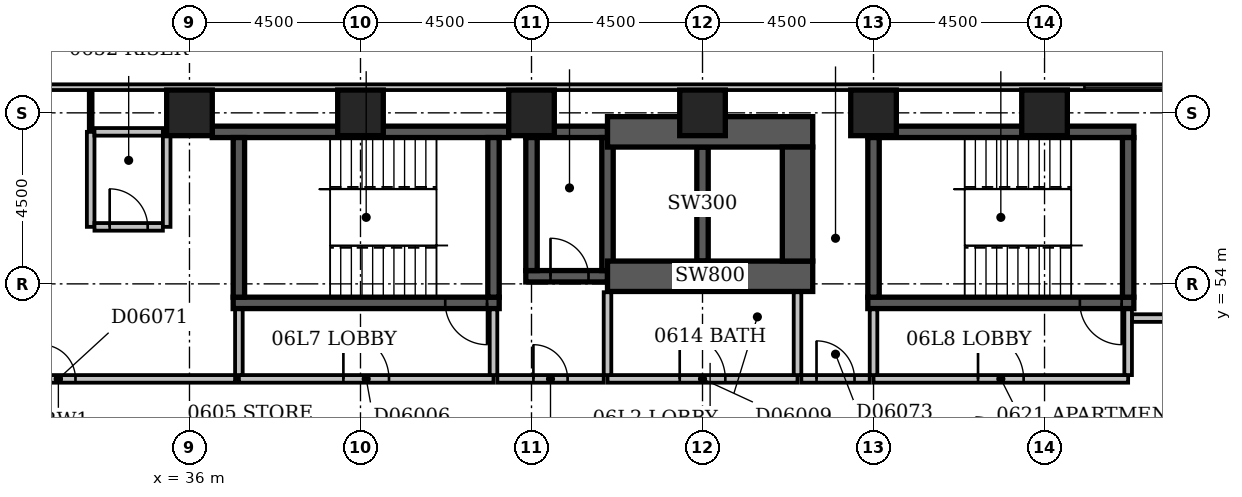
"""IFC4 building model, lengths in metres.
Left out: names, types, materials, properties, quantities, classifications, styles, units other than length and angle.
Written with IfcOpenShell. Run it as: python <this file> out.ifc"""

import sys

from ifc_helpers import new_model, si_unit, direction, frame, frame_2d, origin, origin_2d, place, context, subcontext, project, spatial, rectangle, extrude, element, fill, save


model = new_model("IFC4")
c1 = context("Model", 3, precision=1e-05, world=origin(), true_north=direction((0.0, 1.0)))
c2 = subcontext(c1, "Body", "Model", "MODEL_VIEW")
j1 = project(units=[si_unit("LENGTHUNIT", "METRE"), si_unit("PLANEANGLEUNIT", "RADIAN")], contexts=[c1])
p1 = place(None, origin())
s1 = spatial("IfcSite", under=j1, at=p1, CompositionType="ELEMENT")
p2 = place(p1, origin())
s2 = spatial("IfcBuilding", under=s1, at=p2, CompositionType="ELEMENT")
p3 = place(p2, frame((0.0, 0.0, 32.6)))
s3 = spatial("IfcBuildingStorey", under=s2, at=p3, CompositionType="ELEMENT", Elevation=32.6)
p4 = place(p3, frame((36.6, 58.0, -0.3), z_axis=(0.0, 0.0, 1.0), x_axis=(1.0, 0.0, 0.0)))
e1 = element("IfcWall", 1, at=p4, inside=s3, PredefinedType="SHEAR", context=c2, shape_type="SweptSolid", body=[
    extrude(rectangle(XDim=7.8, YDim=0.3, at=frame_2d((3.9, 0.0))), origin(), (0.0, 0.0, 1.0), 3.6),
])
p5 = place(p3, frame((37.15, 53.5, -0.3), z_axis=(0.0, 0.0, 1.0), x_axis=(1.0, 0.0, 0.0)))
e2 = element("IfcWall", 2, at=p5, inside=s3, PredefinedType="SHEAR", context=c2, shape_type="SweptSolid", body=[
    extrude(rectangle(XDim=7.0, YDim=0.3, at=frame_2d((3.5, 0.0))), origin(), (0.0, 0.0, 1.0), 3.6),
])
p6 = place(p5, frame((5.58, 0.0, 0.3)))
e3 = element("IfcOpeningElement", 3, at=p6, cuts=e2, PredefinedType="OPENING", context=c2, shape_type="SweptSolid", body=[
    extrude(rectangle(XDim=1.1, YDim=2.1, at=frame_2d((0.55, 1.05))), frame((0.0, 0.162, 0.0), z_axis=(0.0, -1.0, 0.0), x_axis=(1.0, 0.0, 0.0)), (0.0, 0.0, 1.0), 0.324),
])
for number, where, z_axis, x_axis in (
    (4, (37.3, 53.65, -0.3), (0.0, 0.0, 1.0), (0.0, 1.0, 0.0)),
    (5, (44.0, 53.65, -0.3), (0.0, 0.0, 1.0), (0.0, 1.0, 0.0)),
):
    element("IfcWall", number, at=place(p3, frame(where, z_axis=z_axis, x_axis=x_axis)), inside=s3, PredefinedType="SHEAR", context=c2, shape_type="SweptSolid", body=[
        extrude(rectangle(XDim=4.2, YDim=0.3, at=frame_2d((2.1, 0.0))), origin(), (0.0, 0.0, 1.0), 3.6),
    ])
p7 = place(p3, frame((44.85, 54.2, -0.3), z_axis=(0.0, 0.0, 1.0), x_axis=(1.0, 0.0, 0.0)))
e6 = element("IfcWall", 6, at=p7, inside=s3, PredefinedType="SHEAR", context=c2, shape_type="SweptSolid", body=[
    extrude(rectangle(XDim=2.15, YDim=0.3, at=frame_2d((1.075, 0.0))), origin(), (0.0, 0.0, 1.0), 3.6),
])
p8 = place(p7, frame((0.65, 0.0, 0.3)))
e7 = element("IfcOpeningElement", 7, at=p8, cuts=e6, PredefinedType="OPENING", context=c2, shape_type="SweptSolid", body=[
    extrude(rectangle(XDim=1.0, YDim=2.1, at=frame_2d((0.5, 1.05))), frame((0.0, 0.162, 0.0), z_axis=(0.0, -1.0, 0.0), x_axis=(1.0, 0.0, 0.0)), (0.0, 0.0, 1.0), 0.324),
])
p9 = place(p3, frame((44.85, 58.0, -0.3), z_axis=(0.0, 0.0, 1.0), x_axis=(1.0, 0.0, 0.0)))
e8 = element("IfcWall", 8, at=p9, inside=s3, PredefinedType="SHEAR", context=c2, shape_type="SweptSolid", body=[
    extrude(rectangle(XDim=2.15, YDim=0.3, at=frame_2d((1.075, 0.0))), origin(), (0.0, 0.0, 1.0), 3.6),
])
p10 = place(p3, frame((45.0, 54.35, -0.3), z_axis=(0.0, 0.0, 1.0), x_axis=(0.0, 1.0, 0.0)))
e9 = element("IfcWall", 9, at=p10, inside=s3, PredefinedType="SHEAR", context=c2, shape_type="SweptSolid", body=[
    extrude(rectangle(XDim=3.5, YDim=0.3, at=frame_2d((1.75, 0.0))), origin(), (0.0, 0.0, 1.0), 3.6),
])
p11 = place(p3, frame((47.0, 54.2, -0.3), z_axis=(0.0, 0.0, 1.0), x_axis=(1.0, 0.0, 0.0)))
e10 = element("IfcWall", 10, at=p11, inside=s3, PredefinedType="SHEAR", context=c2, shape_type="SweptSolid", body=[
    extrude(rectangle(XDim=5.4, YDim=0.8, at=frame_2d((2.7, 0.0))), origin(), (0.0, 0.0, 1.0), 3.6),
])
p12 = place(p3, frame((47.0, 54.35, -0.3), z_axis=(0.0, 0.0, 1.0), x_axis=(0.0, 1.0, 0.0)))
e11 = element("IfcWall", 11, at=p12, inside=s3, PredefinedType="SHEAR", context=c2, shape_type="SweptSolid", body=[
    extrude(rectangle(XDim=3.5, YDim=0.3, at=frame_2d((1.75, 0.0))), origin(), (0.0, 0.0, 1.0), 3.6),
])
p13 = place(p3, frame((47.0, 58.0, -0.3), z_axis=(0.0, 0.0, 1.0), x_axis=(1.0, 0.0, 0.0)))
e12 = element("IfcWall", 12, at=p13, inside=s3, PredefinedType="SHEAR", context=c2, shape_type="SweptSolid", body=[
    extrude(rectangle(XDim=5.4, YDim=0.8, at=frame_2d((2.7, 0.0))), origin(), (0.0, 0.0, 1.0), 3.6),
])
p14 = place(p3, frame((49.5, 54.6, -0.3), z_axis=(0.0, 0.0, 1.0), x_axis=(0.0, 1.0, 0.0)))
e13 = element("IfcWall", 13, at=p14, inside=s3, PredefinedType="SHEAR", context=c2, shape_type="SweptSolid", body=[
    extrude(rectangle(XDim=3.0, YDim=0.3, at=frame_2d((1.5, 0.0))), origin(), (0.0, 0.0, 1.0), 3.6),
])
p15 = place(p3, frame((52.0, 54.6, -0.3), z_axis=(0.0, 0.0, 1.0), x_axis=(0.0, 1.0, 0.0)))
e14 = element("IfcWall", 14, at=p15, inside=s3, PredefinedType="SHEAR", context=c2, shape_type="SweptSolid", body=[
    extrude(rectangle(XDim=3.0, YDim=0.8, at=frame_2d((1.5, 0.0))), origin(), (0.0, 0.0, 1.0), 3.6),
])
p16 = place(p3, frame((53.85, 53.5, -0.3), z_axis=(0.0, 0.0, 1.0), x_axis=(1.0, 0.0, 0.0)))
e15 = element("IfcWall", 15, at=p16, inside=s3, PredefinedType="SHEAR", context=c2, shape_type="SweptSolid", body=[
    extrude(rectangle(XDim=7.0, YDim=0.3, at=frame_2d((3.5, 0.0))), origin(), (0.0, 0.0, 1.0), 3.6),
])
p17 = place(p16, frame((5.58, 0.0, 0.3)))
e16 = element("IfcOpeningElement", 16, at=p17, cuts=e15, PredefinedType="OPENING", context=c2, shape_type="SweptSolid", body=[
    extrude(rectangle(XDim=1.1, YDim=2.1, at=frame_2d((0.55, 1.05))), frame((0.0, 0.162, 0.0), z_axis=(0.0, -1.0, 0.0), x_axis=(1.0, 0.0, 0.0)), (0.0, 0.0, 1.0), 0.324),
])
p18 = place(p3, frame((53.85, 58.0, -0.3), z_axis=(0.0, 0.0, 1.0), x_axis=(1.0, 0.0, 0.0)))
e17 = element("IfcWall", 17, at=p18, inside=s3, PredefinedType="SHEAR", context=c2, shape_type="SweptSolid", body=[
    extrude(rectangle(XDim=7.0, YDim=0.3, at=frame_2d((3.5, 0.0))), origin(), (0.0, 0.0, 1.0), 3.6),
])
for number, where, z_axis, x_axis in (
    (18, (54.0, 53.65, -0.3), (0.0, 0.0, 1.0), (0.0, 1.0, 0.0)),
    (19, (60.7, 53.65, -0.3), (0.0, 0.0, 1.0), (0.0, 1.0, 0.0)),
):
    element("IfcWall", number, at=place(p3, frame(where, z_axis=z_axis, x_axis=x_axis)), inside=s3, PredefinedType="SHEAR", context=c2, shape_type="SweptSolid", body=[
        extrude(rectangle(XDim=4.2, YDim=0.3, at=frame_2d((2.1, 0.0))), origin(), (0.0, 0.0, 1.0), 3.6),
    ])
for number, where, z_axis, x_axis in (
    (20, (36.0, 58.5, -0.3), (0.0, 0.0, 1.0), (1.0, 0.0, 0.0)),
    (21, (40.5, 58.5, -0.3), (0.0, 0.0, 1.0), (1.0, 0.0, 0.0)),
    (22, (45.0, 58.5, -0.3), (0.0, 0.0, 1.0), (1.0, 0.0, 0.0)),
    (23, (49.5, 58.5, -0.3), (0.0, 0.0, 1.0), (1.0, 0.0, 0.0)),
    (24, (54.0, 58.5, -0.3), (0.0, 0.0, 1.0), (1.0, 0.0, 0.0)),
    (25, (58.5, 58.5, -0.3), (0.0, 0.0, 1.0), (1.0, 0.0, 0.0)),
):
    element("IfcColumn", number, at=place(p3, frame(where, z_axis=z_axis, x_axis=x_axis)), inside=s3, PredefinedType="COLUMN", context=c2, shape_type="SweptSolid", body=[
        extrude(rectangle(XDim=1.2, YDim=1.2, at=origin_2d()), origin(), (0.0, 0.0, 1.0), 3.6),
    ])
p19 = place(p3, frame((68.1, 59.175, 0.0), z_axis=(0.0, 0.0, 1.0), x_axis=(-1.0, 0.0, 0.0)))
e26 = element("IfcWall", 26, at=p19, inside=s3, PredefinedType="STANDARD", context=c2, shape_type="SweptSolid", body=[
    extrude(rectangle(XDim=68.85, YDim=0.15, at=frame_2d((34.425, 0.0))), origin(), (0.0, 0.0, 1.0), 2.7),
])
p20 = place(p19, frame((1.65, 0.0, 0.6)))
e27 = element("IfcOpeningElement", 27, at=p20, cuts=e26, PredefinedType="OPENING", context=c2, shape_type="SweptSolid", body=[
    extrude(rectangle(XDim=2.4, YDim=1.8, at=frame_2d((1.2, 0.9))), frame((0.0, 0.087, 0.0), z_axis=(0.0, -1.0, 0.0), x_axis=(1.0, 0.0, 0.0)), (0.0, 0.0, 1.0), 0.174),
])
p21 = place(p19, frame((6.15, 0.0, 0.6)))
e28 = element("IfcOpeningElement", 28, at=p21, cuts=e26, PredefinedType="OPENING", context=c2, shape_type="SweptSolid", body=[
    extrude(rectangle(XDim=2.4, YDim=1.8, at=frame_2d((1.2, 0.9))), frame((0.0, 0.087, 0.0), z_axis=(0.0, -1.0, 0.0), x_axis=(1.0, 0.0, 0.0)), (0.0, 0.0, 1.0), 0.174),
])
p22 = place(p19, frame((38.67, 0.0, 0.6)))
e29 = element("IfcOpeningElement", 29, at=p22, cuts=e26, PredefinedType="OPENING", context=c2, shape_type="SweptSolid", body=[
    extrude(rectangle(XDim=1.5, YDim=1.8, at=frame_2d((0.75, 0.9))), frame((0.0, 0.087, 0.0), z_axis=(0.0, -1.0, 0.0), x_axis=(1.0, 0.0, 0.0)), (0.0, 0.0, 1.0), 0.174),
])
p23 = place(p3, frame((47.0, 51.5, 0.0), z_axis=(0.0, 0.0, 1.0), x_axis=(1.0, 0.0, 0.0)))
e30 = element("IfcWall", 30, at=p23, inside=s3, PredefinedType="PARTITIONING", context=c2, shape_type="SweptSolid", body=[
    extrude(rectangle(XDim=5.0, YDim=0.2, at=frame_2d((2.5, 0.0))), origin(), (0.0, 0.0, 1.0), 3.3),
])
p24 = place(p23, frame((1.9, 0.0, 0.0)))
e31 = element("IfcOpeningElement", 31, at=p24, cuts=e30, PredefinedType="OPENING", context=c2, shape_type="SweptSolid", body=[
    extrude(rectangle(XDim=1.2, YDim=2.1, at=frame_2d((0.6, 1.05))), frame((0.0, 0.112, 0.0), z_axis=(0.0, -1.0, 0.0), x_axis=(1.0, 0.0, 0.0)), (0.0, 0.0, 1.0), 0.224),
])
for number, where, z_axis, x_axis in (
    (32, (52.0, 51.6, 0.0), (0.0, 0.0, 1.0), (0.0, 1.0, 0.0)),
    (33, (47.0, 51.6, 0.0), (0.0, 0.0, 1.0), (0.0, 1.0, 0.0)),
):
    element("IfcWall", number, at=place(p3, frame(where, z_axis=z_axis, x_axis=x_axis)), inside=s3, PredefinedType="PARTITIONING", context=c2, shape_type="SweptSolid", body=[
        extrude(rectangle(XDim=2.18, YDim=0.2, at=frame_2d((1.09, 0.0))), origin(), (0.0, 0.0, 1.0), 3.3),
    ])
p25 = place(p3, frame((37.3, 51.5, 0.0), z_axis=(0.0, 0.0, 1.0), x_axis=(1.0, 0.0, 0.0)))
e34 = element("IfcWall", 34, at=p25, inside=s3, PredefinedType="PARTITIONING", context=c2, shape_type="SweptSolid", body=[
    extrude(rectangle(XDim=6.7, YDim=0.2, at=frame_2d((3.35, 0.0))), origin(), (0.0, 0.0, 1.0), 3.3),
])
p26 = place(p25, frame((2.75, 0.0, 0.0)))
e35 = element("IfcOpeningElement", 35, at=p26, cuts=e34, PredefinedType="OPENING", context=c2, shape_type="SweptSolid", body=[
    extrude(rectangle(XDim=1.2, YDim=2.1, at=frame_2d((0.6, 1.05))), frame((0.0, 0.112, 0.0), z_axis=(0.0, -1.0, 0.0), x_axis=(1.0, 0.0, 0.0)), (0.0, 0.0, 1.0), 0.224),
])
for number, where, z_axis, x_axis in (
    (36, (44.0, 51.6, 0.0), (0.0, 0.0, 1.0), (0.0, 1.0, 0.0)),
    (37, (37.3, 51.6, 0.0), (0.0, 0.0, 1.0), (0.0, 1.0, 0.0)),
):
    element("IfcWall", number, at=place(p3, frame(where, z_axis=z_axis, x_axis=x_axis)), inside=s3, PredefinedType="PARTITIONING", context=c2, shape_type="SweptSolid", body=[
        extrude(rectangle(XDim=1.73, YDim=0.2, at=frame_2d((0.865, 0.0))), origin(), (0.0, 0.0, 1.0), 3.3),
    ])
p27 = place(p3, frame((54.0, 51.5, 0.0), z_axis=(0.0, 0.0, 1.0), x_axis=(1.0, 0.0, 0.0)))
e38 = element("IfcWall", 38, at=p27, inside=s3, PredefinedType="PARTITIONING", context=c2, shape_type="SweptSolid", body=[
    extrude(rectangle(XDim=6.7, YDim=0.2, at=frame_2d((3.35, 0.0))), origin(), (0.0, 0.0, 1.0), 3.3),
])
p28 = place(p27, frame((2.75, 0.0, 0.0)))
e39 = element("IfcOpeningElement", 39, at=p28, cuts=e38, PredefinedType="OPENING", context=c2, shape_type="SweptSolid", body=[
    extrude(rectangle(XDim=1.2, YDim=2.1, at=frame_2d((0.6, 1.05))), frame((0.0, 0.112, 0.0), z_axis=(0.0, -1.0, 0.0), x_axis=(1.0, 0.0, 0.0)), (0.0, 0.0, 1.0), 0.224),
])
p29 = place(p3, frame((60.7, 51.6, 0.0), z_axis=(0.0, 0.0, 1.0), x_axis=(0.0, 1.0, 0.0)))
e40 = element("IfcWall", 40, at=p29, inside=s3, PredefinedType="PARTITIONING", context=c2, shape_type="SweptSolid", body=[
    extrude(rectangle(XDim=1.73, YDim=0.2, at=frame_2d((0.865, 0.0))), origin(), (0.0, 0.0, 1.0), 3.3),
])
p30 = place(p3, frame((54.0, 51.6, 0.0), z_axis=(0.0, 0.0, 1.0), x_axis=(0.0, 1.0, 0.0)))
e41 = element("IfcWall", 41, at=p30, inside=s3, PredefinedType="PARTITIONING", context=c2, shape_type="SweptSolid", body=[
    extrude(rectangle(XDim=1.73, YDim=0.2, at=frame_2d((0.865, 0.0))), origin(), (0.0, 0.0, 1.0), 2.6),
])
p31 = place(p3, frame((27.9, 51.5, 0.0), z_axis=(0.0, 0.0, 1.0), x_axis=(1.0, 0.0, 0.0)))
e42 = element("IfcWall", 42, at=p31, inside=s3, PredefinedType="PARTITIONING", context=c2, shape_type="SweptSolid", body=[
    extrude(rectangle(XDim=9.3, YDim=0.2, at=frame_2d((4.65, 0.0))), origin(), (0.0, 0.0, 1.0), 3.3),
])
p32 = place(p31, frame((4.2, 0.0, 0.0)))
e43 = element("IfcOpeningElement", 43, at=p32, cuts=e42, PredefinedType="OPENING", context=c2, shape_type="SweptSolid", body=[
    extrude(rectangle(XDim=0.9, YDim=2.1, at=frame_2d((0.45, 1.05))), frame((0.0, 0.112, 0.0), z_axis=(0.0, -1.0, 0.0), x_axis=(1.0, 0.0, 0.0)), (0.0, 0.0, 1.0), 0.224),
])
p33 = place(p3, frame((44.1, 51.5, 0.0), z_axis=(0.0, 0.0, 1.0), x_axis=(1.0, 0.0, 0.0)))
e44 = element("IfcWall", 44, at=p33, inside=s3, PredefinedType="PARTITIONING", context=c2, shape_type="SweptSolid", body=[
    extrude(rectangle(XDim=2.8, YDim=0.2, at=frame_2d((1.4, 0.0))), origin(), (0.0, 0.0, 1.0), 3.3),
])
p34 = place(p33, frame((0.95, 0.0, 0.0)))
e45 = element("IfcOpeningElement", 45, at=p34, cuts=e44, PredefinedType="OPENING", context=c2, shape_type="SweptSolid", body=[
    extrude(rectangle(XDim=0.9, YDim=2.1, at=frame_2d((0.45, 1.05))), frame((0.0, 0.112, 0.0), z_axis=(0.0, -1.0, 0.0), x_axis=(1.0, 0.0, 0.0)), (0.0, 0.0, 1.0), 0.224),
])
p35 = place(p3, frame((52.1, 51.5, 0.0), z_axis=(0.0, 0.0, 1.0), x_axis=(1.0, 0.0, 0.0)))
e46 = element("IfcWall", 46, at=p35, inside=s3, PredefinedType="PARTITIONING", context=c2, shape_type="SweptSolid", body=[
    extrude(rectangle(XDim=1.8, YDim=0.2, at=frame_2d((0.9, 0.0))), origin(), (0.0, 0.0, 1.0), 3.3),
])
p36 = place(p35, frame((0.4, 0.0, 0.0)))
e47 = element("IfcOpeningElement", 47, at=p36, cuts=e46, PredefinedType="OPENING", context=c2, shape_type="SweptSolid", body=[
    extrude(rectangle(XDim=1.0, YDim=2.1, at=frame_2d((0.5, 1.05))), frame((0.0, 0.112, 0.0), z_axis=(0.0, -1.0, 0.0), x_axis=(1.0, 0.0, 0.0)), (0.0, 0.0, 1.0), 0.224),
])
p37 = place(p3, frame((60.8, 53.1, 0.0), z_axis=(0.0, 0.0, 1.0), x_axis=(1.0, 0.0, 0.0)))
e48 = element("IfcWall", 48, at=p37, inside=s3, PredefinedType="PARTITIONING", context=c2, shape_type="SweptSolid", body=[
    extrude(rectangle(XDim=7.3, YDim=0.2, at=frame_2d((3.65, 0.0))), origin(), (0.0, 0.0, 1.0), 3.3),
])
p38 = place(p37, frame((2.85, 0.0, 0.0)))
e49 = element("IfcOpeningElement", 49, at=p38, cuts=e48, PredefinedType="OPENING", context=c2, shape_type="SweptSolid", body=[
    extrude(rectangle(XDim=0.9, YDim=2.1, at=frame_2d((0.45, 1.05))), frame((0.0, 0.112, 0.0), z_axis=(0.0, -1.0, 0.0), x_axis=(1.0, 0.0, 0.0)), (0.0, 0.0, 1.0), 0.224),
])
p39 = place(p3, frame((33.4, 55.5, 0.0), z_axis=(0.0, 0.0, 1.0), x_axis=(0.0, 1.0, 0.0)))
e50 = element("IfcWall", 50, at=p39, inside=s3, PredefinedType="PARTITIONING", context=c2, shape_type="SweptSolid", body=[
    extrude(rectangle(XDim=2.5, YDim=0.2, at=frame_2d((1.25, 0.0))), origin(), (0.0, 0.0, 1.0), 3.3),
])
p40 = place(p3, frame((33.5, 55.5, 0.0), z_axis=(0.0, 0.0, 1.0), x_axis=(1.0, 0.0, 0.0)))
e51 = element("IfcWall", 51, at=p40, inside=s3, PredefinedType="PARTITIONING", context=c2, shape_type="SweptSolid", body=[
    extrude(rectangle(XDim=1.8, YDim=0.2, at=frame_2d((0.9, 0.0))), origin(), (0.0, 0.0, 1.0), 3.3),
])
p41 = place(p40, frame((0.4, 0.0, 0.0)))
e52 = element("IfcOpeningElement", 52, at=p41, cuts=e51, PredefinedType="OPENING", context=c2, shape_type="SweptSolid", body=[
    extrude(rectangle(XDim=1.0, YDim=2.1, at=frame_2d((0.5, 1.05))), frame((0.0, 0.112, 0.0), z_axis=(0.0, -1.0, 0.0), x_axis=(1.0, 0.0, 0.0)), (0.0, 0.0, 1.0), 0.224),
])
p42 = place(p3, frame((35.4, 55.5, 0.0), z_axis=(0.0, 0.0, 1.0), x_axis=(0.0, 1.0, 0.0)))
e53 = element("IfcWall", 53, at=p42, inside=s3, PredefinedType="PARTITIONING", context=c2, shape_type="SweptSolid", body=[
    extrude(rectangle(XDim=2.5, YDim=0.2, at=frame_2d((1.25, 0.0))), origin(), (0.0, 0.0, 1.0), 2.4),
])
p43 = place(p3, frame((33.4, 58.0, 0.0), z_axis=(0.0, 0.0, 1.0), x_axis=(0.0, 1.0, 0.0)))
e54 = element("IfcWall", 54, at=p43, inside=s3, PredefinedType="PARTITIONING", context=c2, shape_type="SweptSolid", body=[
    extrude(rectangle(XDim=1.1, YDim=0.1, at=frame_2d((0.55, 0.0))), origin(), (0.0, 0.0, 1.0), 3.3),
])
p44 = place(p3, frame((33.5, 58.0, 0.0), z_axis=(0.0, 0.0, 1.0), x_axis=(1.0, 0.0, 0.0)))
e55 = element("IfcWall", 55, at=p44, inside=s3, PredefinedType="PARTITIONING", context=c2, shape_type="SweptSolid", body=[
    extrude(rectangle(XDim=1.8, YDim=0.2, at=frame_2d((0.9, 0.0))), origin(), (0.0, 0.0, 1.0), 3.3),
])
p45 = place(p21, origin())
e56 = element("IfcWindow", 56, at=p45, inside=s3, PartitioningType="SINGLE_PANEL", PredefinedType="WINDOW", context=c2, shape_type="SweptSolid", body=[
    extrude(rectangle(XDim=2.4, YDim=1.8, at=frame_2d((1.2, 0.9))), frame((0.0, 0.03, 0.0), z_axis=(0.0, -1.0, 0.0), x_axis=(1.0, 0.0, 0.0)), (0.0, 0.0, 1.0), 0.06),
])
fill(e28, e56)
p46 = place(p26, origin())
e57 = element("IfcDoor", 57, at=p46, inside=s3, OperationType="SINGLE_SWING_LEFT", PredefinedType="DOOR", context=c2, shape_type="SweptSolid", body=[
    extrude(rectangle(XDim=1.2, YDim=2.1, at=frame_2d((0.6, 1.05))), frame((0.0, 0.025, 0.0), z_axis=(0.0, -1.0, 0.0), x_axis=(1.0, 0.0, 0.0)), (0.0, 0.0, 1.0), 0.05),
])
fill(e35, e57)
p47 = place(p28, origin())
e58 = element("IfcDoor", 58, at=p47, inside=s3, OperationType="SINGLE_SWING_LEFT", PredefinedType="DOOR", context=c2, shape_type="SweptSolid", body=[
    extrude(rectangle(XDim=1.2, YDim=2.1, at=frame_2d((0.6, 1.05))), frame((0.0, 0.025, 0.0), z_axis=(0.0, -1.0, 0.0), x_axis=(1.0, 0.0, 0.0)), (0.0, 0.0, 1.0), 0.05),
])
fill(e39, e58)
p48 = place(p24, origin())
e59 = element("IfcDoor", 59, at=p48, inside=s3, OperationType="SINGLE_SWING_LEFT", PredefinedType="DOOR", context=c2, shape_type="SweptSolid", body=[
    extrude(rectangle(XDim=1.2, YDim=2.1, at=frame_2d((0.6, 1.05))), frame((0.0, 0.025, 0.0), z_axis=(0.0, -1.0, 0.0), x_axis=(1.0, 0.0, 0.0)), (0.0, 0.0, 1.0), 0.05),
])
fill(e31, e59)
p49 = place(p8, origin())
e60 = element("IfcDoor", 60, at=p49, inside=s3, OperationType="SINGLE_SWING_LEFT", PredefinedType="DOOR", context=c2, shape_type="SweptSolid", body=[
    extrude(rectangle(XDim=1.0, YDim=2.1, at=frame_2d((0.5, 1.05))), frame((0.0, 0.025, 0.0), z_axis=(0.0, -1.0, 0.0), x_axis=(1.0, 0.0, 0.0)), (0.0, 0.0, 1.0), 0.05),
])
fill(e7, e60)
p50 = place(p6, origin())
e61 = element("IfcDoor", 61, at=p50, inside=s3, OperationType="SINGLE_SWING_RIGHT", PredefinedType="DOOR", context=c2, shape_type="SweptSolid", body=[
    extrude(rectangle(XDim=1.1, YDim=2.1, at=frame_2d((0.55, 1.05))), frame((0.0, 0.025, 0.0), z_axis=(0.0, -1.0, 0.0), x_axis=(1.0, 0.0, 0.0)), (0.0, 0.0, 1.0), 0.05),
])
fill(e3, e61)
p51 = place(p17, origin())
e62 = element("IfcDoor", 62, at=p51, inside=s3, OperationType="SINGLE_SWING_RIGHT", PredefinedType="DOOR", context=c2, shape_type="SweptSolid", body=[
    extrude(rectangle(XDim=1.1, YDim=2.1, at=frame_2d((0.55, 1.05))), frame((0.0, 0.025, 0.0), z_axis=(0.0, -1.0, 0.0), x_axis=(1.0, 0.0, 0.0)), (0.0, 0.0, 1.0), 0.05),
])
fill(e16, e62)
p52 = place(p32, origin())
e63 = element("IfcDoor", 63, at=p52, inside=s3, OperationType="SINGLE_SWING_LEFT", PredefinedType="DOOR", context=c2, shape_type="SweptSolid", body=[
    extrude(rectangle(XDim=0.9, YDim=2.1, at=frame_2d((0.45, 1.05))), frame((0.0, 0.025, 0.0), z_axis=(0.0, -1.0, 0.0), x_axis=(1.0, 0.0, 0.0)), (0.0, 0.0, 1.0), 0.05),
])
fill(e43, e63)
p53 = place(p34, origin())
e64 = element("IfcDoor", 64, at=p53, inside=s3, OperationType="SINGLE_SWING_LEFT", PredefinedType="DOOR", context=c2, shape_type="SweptSolid", body=[
    extrude(rectangle(XDim=0.9, YDim=2.1, at=frame_2d((0.45, 1.05))), frame((0.0, 0.025, 0.0), z_axis=(0.0, -1.0, 0.0), x_axis=(1.0, 0.0, 0.0)), (0.0, 0.0, 1.0), 0.05),
])
fill(e45, e64)
p54 = place(p36, origin())
e65 = element("IfcDoor", 65, at=p54, inside=s3, OperationType="SINGLE_SWING_LEFT", PredefinedType="DOOR", context=c2, shape_type="SweptSolid", body=[
    extrude(rectangle(XDim=1.0, YDim=2.1, at=frame_2d((0.5, 1.05))), frame((0.0, 0.025, 0.0), z_axis=(0.0, -1.0, 0.0), x_axis=(1.0, 0.0, 0.0)), (0.0, 0.0, 1.0), 0.05),
])
fill(e47, e65)
p55 = place(p41, origin())
e66 = element("IfcDoor", 66, at=p55, inside=s3, OperationType="SINGLE_SWING_LEFT", PredefinedType="DOOR", context=c2, shape_type="SweptSolid", body=[
    extrude(rectangle(XDim=1.0, YDim=2.1, at=frame_2d((0.5, 1.05))), frame((0.0, 0.025, 0.0), z_axis=(0.0, -1.0, 0.0), x_axis=(1.0, 0.0, 0.0)), (0.0, 0.0, 1.0), 0.05),
])
fill(e52, e66)
save(model, sys.argv[1])
